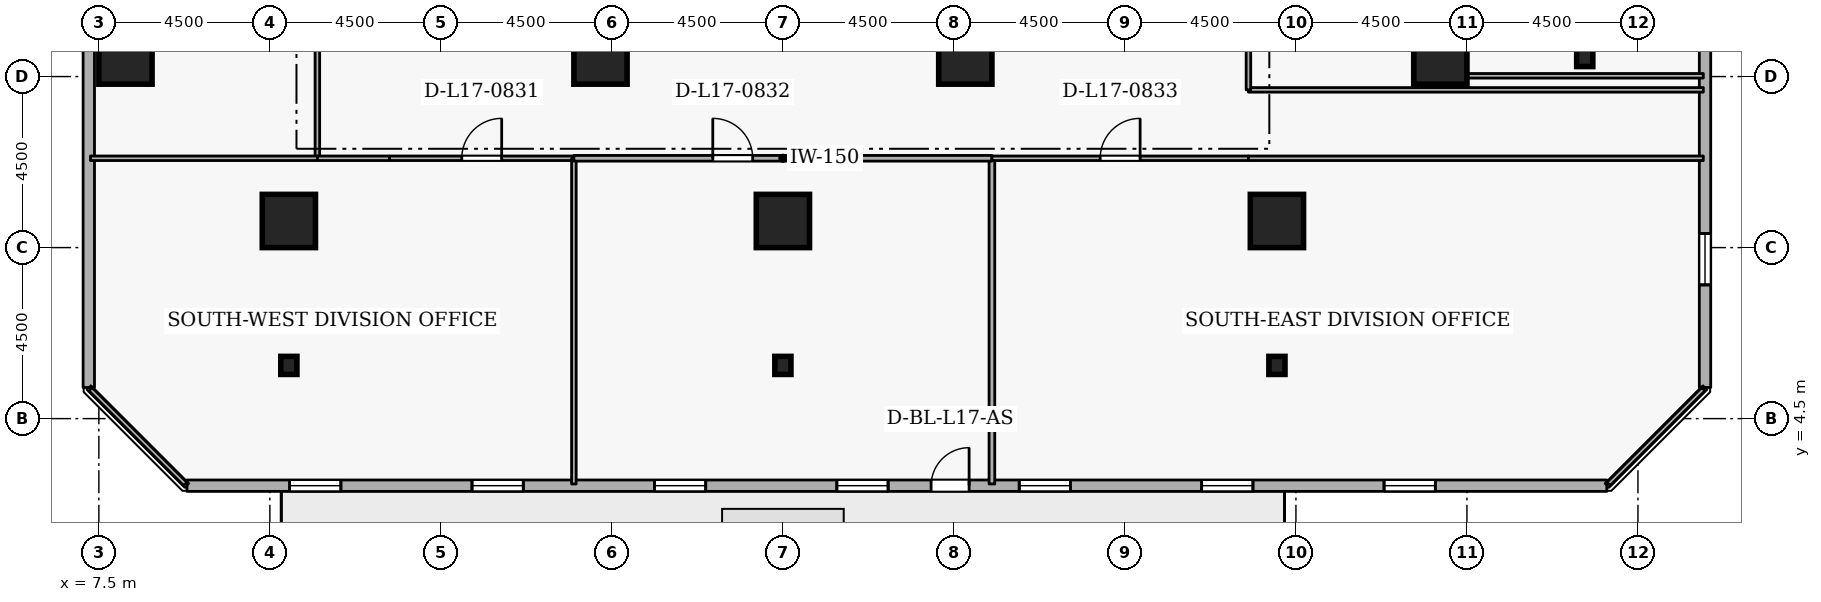
"""IFC4 building model, lengths in metres.
Left out: names, types, materials, properties, quantities, classifications, styles, units other than length and angle.
Written with IfcOpenShell. Run it as: python <this file> out.ifc"""

import sys

from ifc_helpers import new_model, si_unit, direction, frame, frame_2d, origin, origin_2d, place, context, subcontext, project, spatial, rectangle, i_section, extrude, element, fill, save


model = new_model("IFC4")
c1 = context("Model", 3, precision=1e-05, world=origin(), true_north=direction((0.0, 1.0)))
c2 = subcontext(c1, "Body", "Model", "MODEL_VIEW")
j1 = project(units=[si_unit("LENGTHUNIT", "METRE"), si_unit("PLANEANGLEUNIT", "RADIAN")], contexts=[c1])
p1 = place(None, origin())
s1 = spatial("IfcSite", under=j1, at=p1, CompositionType="ELEMENT")
p2 = place(p1, origin())
s2 = spatial("IfcBuilding", under=s1, at=p2, CompositionType="ELEMENT")
p3 = place(p2, frame((0.0, 0.0, 68.1)))
s3 = spatial("IfcBuildingStorey", under=s2, at=p3, CompositionType="ELEMENT", Elevation=68.1)
for number, where, z_axis, x_axis in (
    (1, (12.5, 9.7, 0.0), (0.0, 0.0, 1.0), (1.0, 0.0, 0.0)),
    (2, (25.5, 9.7, 0.0), (0.0, 0.0, 1.0), (1.0, 0.0, 0.0)),
    (3, (38.5, 9.7, 0.0), (0.0, 0.0, 1.0), (1.0, 0.0, 0.0)),
    (4, (42.8, 14.0, 0.0), (0.0, 0.0, 1.0), (1.0, 0.0, 0.0)),
    (5, (8.2, 14.0, 0.0), (0.0, 0.0, 1.0), (1.0, 0.0, 0.0)),
    (6, (20.7, 14.0, 0.0), (0.0, 0.0, 1.0), (1.0, 0.0, 0.0)),
    (7, (30.3, 14.0, 0.0), (0.0, 0.0, 1.0), (1.0, 0.0, 0.0)),
):
    element("IfcColumn", number, at=place(p3, frame(where, z_axis=z_axis, x_axis=x_axis)), inside=s3, PredefinedType="COLUMN", context=c2, shape_type="SweptSolid", body=[
        extrude(rectangle(XDim=1.4, YDim=1.4, at=origin_2d()), origin(), (0.0, 0.0, 1.0), 3.6),
    ])
for number, where, z_axis, x_axis in (
    (8, (12.5, 5.9, 0.0), (0.0, 0.0, 1.0), (1.0, 0.0, 0.0)),
    (9, (25.5, 5.9, 0.0), (0.0, 0.0, 1.0), (1.0, 0.0, 0.0)),
    (10, (38.5, 5.9, 0.0), (0.0, 0.0, 1.0), (1.0, 0.0, 0.0)),
    (11, (46.6, 14.0, 0.0), (0.0, 0.0, 1.0), (1.0, 0.0, 0.0)),
):
    element("IfcColumn", number, at=place(p3, frame(where, z_axis=z_axis, x_axis=x_axis)), inside=s3, PredefinedType="COLUMN", context=c2, shape_type="SweptSolid", body=[
        extrude(i_section(OverallWidth=0.424, OverallDepth=0.475, WebThickness=0.048, FlangeThickness=0.077, FilletRadius=0.015, at=origin_2d()), origin(), (0.0, 0.0, 1.0), 3.6),
    ])
p4 = place(p3, frame((9.819, 2.735, 0.0), z_axis=(0.0, 0.0, 1.0), x_axis=(1.0, 0.0, 0.0)))
e12 = element("IfcWall", 12, at=p4, inside=s3, PredefinedType="STANDARD", context=c2, shape_type="SweptSolid", body=[
    extrude(rectangle(XDim=37.362, YDim=0.3, at=frame_2d((18.681, 0.0))), origin(), (0.0, 0.0, 1.0), 2.66),
])
p5 = place(p4, frame((19.581, 0.0, 0.0)))
e13 = element("IfcOpeningElement", 13, at=p5, cuts=e12, PredefinedType="OPENING", context=c2, shape_type="SweptSolid", body=[
    extrude(rectangle(XDim=1.0, YDim=2.08, at=frame_2d((0.5, 1.04))), frame((0.0, 0.16, 0.0), z_axis=(0.0, -1.0, 0.0), x_axis=(1.0, 0.0, 0.0)), (0.0, 0.0, 1.0), 0.32),
])
p6 = place(p4, frame((2.7, 0.0, 0.72)))
e14 = element("IfcOpeningElement", 14, at=p6, cuts=e12, PredefinedType="OPENING", context=c2, shape_type="SweptSolid", body=[
    extrude(rectangle(XDim=1.35, YDim=1.05, at=frame_2d((0.675, 0.525))), frame((0.0, 0.16, 0.0), z_axis=(0.0, -1.0, 0.0), x_axis=(1.0, 0.0, 0.0)), (0.0, 0.0, 1.0), 0.32),
])
p7 = place(p4, frame((7.5, 0.0, 0.72)))
e15 = element("IfcOpeningElement", 15, at=p7, cuts=e12, PredefinedType="OPENING", context=c2, shape_type="SweptSolid", body=[
    extrude(rectangle(XDim=1.35, YDim=1.05, at=frame_2d((0.675, 0.525))), frame((0.0, 0.16, 0.0), z_axis=(0.0, -1.0, 0.0), x_axis=(1.0, 0.0, 0.0)), (0.0, 0.0, 1.0), 0.32),
])
p8 = place(p4, frame((12.3, 0.0, 0.72)))
e16 = element("IfcOpeningElement", 16, at=p8, cuts=e12, PredefinedType="OPENING", context=c2, shape_type="SweptSolid", body=[
    extrude(rectangle(XDim=1.35, YDim=1.05, at=frame_2d((0.675, 0.525))), frame((0.0, 0.16, 0.0), z_axis=(0.0, -1.0, 0.0), x_axis=(1.0, 0.0, 0.0)), (0.0, 0.0, 1.0), 0.32),
])
p9 = place(p4, frame((17.1, 0.0, 0.72)))
e17 = element("IfcOpeningElement", 17, at=p9, cuts=e12, PredefinedType="OPENING", context=c2, shape_type="SweptSolid", body=[
    extrude(rectangle(XDim=1.35, YDim=1.05, at=frame_2d((0.675, 0.525))), frame((0.0, 0.16, 0.0), z_axis=(0.0, -1.0, 0.0), x_axis=(1.0, 0.0, 0.0)), (0.0, 0.0, 1.0), 0.32),
])
p10 = place(p4, frame((21.9, 0.0, 0.72)))
e18 = element("IfcOpeningElement", 18, at=p10, cuts=e12, PredefinedType="OPENING", context=c2, shape_type="SweptSolid", body=[
    extrude(rectangle(XDim=1.35, YDim=1.05, at=frame_2d((0.675, 0.525))), frame((0.0, 0.16, 0.0), z_axis=(0.0, -1.0, 0.0), x_axis=(1.0, 0.0, 0.0)), (0.0, 0.0, 1.0), 0.32),
])
p11 = place(p4, frame((26.7, 0.0, 0.72)))
e19 = element("IfcOpeningElement", 19, at=p11, cuts=e12, PredefinedType="OPENING", context=c2, shape_type="SweptSolid", body=[
    extrude(rectangle(XDim=1.35, YDim=1.05, at=frame_2d((0.675, 0.525))), frame((0.0, 0.16, 0.0), z_axis=(0.0, -1.0, 0.0), x_axis=(1.0, 0.0, 0.0)), (0.0, 0.0, 1.0), 0.32),
])
p12 = place(p4, frame((31.5, 0.0, 0.72)))
e20 = element("IfcOpeningElement", 20, at=p12, cuts=e12, PredefinedType="OPENING", context=c2, shape_type="SweptSolid", body=[
    extrude(rectangle(XDim=1.35, YDim=1.05, at=frame_2d((0.675, 0.525))), frame((0.0, 0.16, 0.0), z_axis=(0.0, -1.0, 0.0), x_axis=(1.0, 0.0, 0.0)), (0.0, 0.0, 1.0), 0.32),
])
p13 = place(p3, frame((49.765, 5.319, 0.0), z_axis=(0.0, 0.0, 1.0), x_axis=(0.0, 1.0, 0.0)))
e21 = element("IfcWall", 21, at=p13, inside=s3, PredefinedType="STANDARD", context=c2, shape_type="SweptSolid", body=[
    extrude(rectangle(XDim=37.362, YDim=0.3, at=frame_2d((18.681, 0.0))), origin(), (0.0, 0.0, 1.0), 2.66),
])
p14 = place(p13, frame((2.7, 0.0, 0.72)))
e22 = element("IfcOpeningElement", 22, at=p14, cuts=e21, PredefinedType="OPENING", context=c2, shape_type="SweptSolid", body=[
    extrude(rectangle(XDim=1.35, YDim=1.05, at=frame_2d((0.675, 0.525))), frame((0.0, 0.16, 0.0), z_axis=(0.0, -1.0, 0.0), x_axis=(1.0, 0.0, 0.0)), (0.0, 0.0, 1.0), 0.32),
])
p15 = place(p13, frame((12.3, 0.0, 0.72)))
e23 = element("IfcOpeningElement", 23, at=p15, cuts=e21, PredefinedType="OPENING", context=c2, shape_type="SweptSolid", body=[
    extrude(rectangle(XDim=1.35, YDim=1.05, at=frame_2d((0.675, 0.525))), frame((0.0, 0.16, 0.0), z_axis=(0.0, -1.0, 0.0), x_axis=(1.0, 0.0, 0.0)), (0.0, 0.0, 1.0), 0.32),
])
p16 = place(p13, frame((26.7, 0.0, 0.72)))
e24 = element("IfcOpeningElement", 24, at=p16, cuts=e21, PredefinedType="OPENING", context=c2, shape_type="SweptSolid", body=[
    extrude(rectangle(XDim=1.35, YDim=1.05, at=frame_2d((0.675, 0.525))), frame((0.0, 0.16, 0.0), z_axis=(0.0, -1.0, 0.0), x_axis=(1.0, 0.0, 0.0)), (0.0, 0.0, 1.0), 0.32),
])
p17 = place(p13, frame((31.5, 0.0, 0.72)))
e25 = element("IfcOpeningElement", 25, at=p17, cuts=e21, PredefinedType="OPENING", context=c2, shape_type="SweptSolid", body=[
    extrude(rectangle(XDim=1.35, YDim=1.05, at=frame_2d((0.675, 0.525))), frame((0.0, 0.16, 0.0), z_axis=(0.0, -1.0, 0.0), x_axis=(1.0, 0.0, 0.0)), (0.0, 0.0, 1.0), 0.32),
])
p18 = place(p3, frame((7.235, 42.681, 0.0), z_axis=(0.0, 0.0, 1.0), x_axis=(0.0, -1.0, 0.0)))
e26 = element("IfcWall", 26, at=p18, inside=s3, PredefinedType="STANDARD", context=c2, shape_type="SweptSolid", body=[
    extrude(rectangle(XDim=37.362, YDim=0.3, at=frame_2d((18.681, 0.0))), origin(), (0.0, 0.0, 1.0), 2.66),
])
p19 = place(p18, frame((7.5, 0.0, 0.72)))
e27 = element("IfcOpeningElement", 27, at=p19, cuts=e26, PredefinedType="OPENING", context=c2, shape_type="SweptSolid", body=[
    extrude(rectangle(XDim=1.35, YDim=1.05, at=frame_2d((0.675, 0.525))), frame((0.0, 0.16, 0.0), z_axis=(0.0, -1.0, 0.0), x_axis=(1.0, 0.0, 0.0)), (0.0, 0.0, 1.0), 0.32),
])
p20 = place(p18, frame((17.1, 0.0, 0.72)))
e28 = element("IfcOpeningElement", 28, at=p20, cuts=e26, PredefinedType="OPENING", context=c2, shape_type="SweptSolid", body=[
    extrude(rectangle(XDim=1.35, YDim=1.05, at=frame_2d((0.675, 0.525))), frame((0.0, 0.16, 0.0), z_axis=(0.0, -1.0, 0.0), x_axis=(1.0, 0.0, 0.0)), (0.0, 0.0, 1.0), 0.32),
])
p21 = place(p18, frame((21.9, 0.0, 0.72)))
e29 = element("IfcOpeningElement", 29, at=p21, cuts=e26, PredefinedType="OPENING", context=c2, shape_type="SweptSolid", body=[
    extrude(rectangle(XDim=1.35, YDim=1.05, at=frame_2d((0.675, 0.525))), frame((0.0, 0.16, 0.0), z_axis=(0.0, -1.0, 0.0), x_axis=(1.0, 0.0, 0.0)), (0.0, 0.0, 1.0), 0.32),
])
p22 = place(p3, frame((13.25, 20.7, 0.0), z_axis=(0.0, 0.0, 1.0), x_axis=(0.0, -1.0, 0.0)))
e30 = element("IfcWall", 30, at=p22, inside=s3, PredefinedType="PARTITIONING", context=c2, shape_type="SweptSolid", body=[
    extrude(rectangle(XDim=9.35, YDim=0.12, at=frame_2d((4.675, 0.0))), origin(), (0.0, 0.0, 1.0), 3.26),
])
p23 = place(p22, frame((4.15, 0.0, 0.0)))
e31 = element("IfcOpeningElement", 31, at=p23, cuts=e30, PredefinedType="OPENING", context=c2, shape_type="SweptSolid", body=[
    extrude(rectangle(XDim=1.05, YDim=2.1, at=frame_2d((0.525, 1.05))), frame((0.0, 0.07, 0.0), z_axis=(0.0, -1.0, 0.0), x_axis=(1.0, 0.0, 0.0)), (0.0, 0.0, 1.0), 0.14),
])
p24 = place(p3, frame((13.25, 11.35, 0.0), z_axis=(0.0, 0.0, 1.0), x_axis=(-1.0, 0.0, 0.0)))
e32 = element("IfcWall", 32, at=p24, inside=s3, PredefinedType="PARTITIONING", context=c2, shape_type="SweptSolid", body=[
    extrude(rectangle(XDim=5.97, YDim=0.12, at=frame_2d((2.985, 0.0))), origin(), (0.0, 0.0, 1.0), 3.26),
])
p25 = place(p3, frame((42.8, 13.52, 0.0), z_axis=(0.0, 0.0, 1.0), x_axis=(1.0, 0.0, 0.0)))
e33 = element("IfcWall", 33, at=p25, inside=s3, PredefinedType="PARTITIONING", context=c2, shape_type="SweptSolid", body=[
    extrude(rectangle(XDim=6.92, YDim=0.12, at=frame_2d((3.46, 0.0))), origin(), (0.0, 0.0, 1.0), 3.26),
])
p26 = place(p3, frame((49.72, 13.15, 0.0), z_axis=(0.0, 0.0, 1.0), x_axis=(-1.0, 0.0, 0.0)))
e34 = element("IfcWall", 34, at=p26, inside=s3, PredefinedType="PARTITIONING", context=c2, shape_type="SweptSolid", body=[
    extrude(rectangle(XDim=11.97, YDim=0.12, at=frame_2d((5.985, 0.0))), origin(), (0.0, 0.0, 1.0), 3.26),
])
p27 = place(p3, frame((37.75, 13.15, 0.0), z_axis=(0.0, 0.0, 1.0), x_axis=(0.0, 1.0, 0.0)))
e35 = element("IfcWall", 35, at=p27, inside=s3, PredefinedType="PARTITIONING", context=c2, shape_type="SweptSolid", body=[
    extrude(rectangle(XDim=1.862, YDim=0.12, at=frame_2d((0.931, 0.0))), origin(), (0.0, 0.0, 1.0), 3.26),
])
p28 = place(p3, frame((13.25, 11.35, 0.0), z_axis=(0.0, 0.0, 1.0), x_axis=(1.0, 0.0, 0.0)))
e36 = element("IfcWall", 36, at=p28, inside=s3, PredefinedType="PARTITIONING", context=c2, shape_type="SweptSolid", body=[
    extrude(rectangle(XDim=1.9, YDim=0.12, at=frame_2d((0.95, 0.0))), origin(), (0.0, 0.0, 1.0), 3.26),
])
p29 = place(p3, frame((15.15, 11.35, 0.0), z_axis=(0.0, 0.0, 1.0), x_axis=(1.0, 0.0, 0.0)))
e37 = element("IfcWall", 37, at=p29, inside=s3, PredefinedType="PARTITIONING", context=c2, shape_type="SweptSolid", body=[
    extrude(rectangle(XDim=4.85, YDim=0.12, at=frame_2d((2.425, 0.0))), origin(), (0.0, 0.0, 1.0), 3.26),
])
p30 = place(p29, frame((1.9, 0.0, 0.0)))
e38 = element("IfcOpeningElement", 38, at=p30, cuts=e37, PredefinedType="OPENING", context=c2, shape_type="SweptSolid", body=[
    extrude(rectangle(XDim=1.05, YDim=2.1, at=frame_2d((0.525, 1.05))), frame((0.0, 0.07, 0.0), z_axis=(0.0, -1.0, 0.0), x_axis=(1.0, 0.0, 0.0)), (0.0, 0.0, 1.0), 0.14),
])
p31 = place(p3, frame((20.0, 11.35, 0.0), z_axis=(0.0, 0.0, 1.0), x_axis=(0.0, -1.0, 0.0)))
e39 = element("IfcWall", 39, at=p31, inside=s3, PredefinedType="PARTITIONING", context=c2, shape_type="SweptSolid", body=[
    extrude(rectangle(XDim=8.57, YDim=0.12, at=frame_2d((4.285, 0.0))), origin(), (0.0, 0.0, 1.0), 3.26),
])
p32 = place(p3, frame((9.775, 2.78, 0.0), z_axis=(0.0, 0.0, 1.0), x_axis=(-0.707106781187, 0.707106781187, 0.0)))
e40 = element("IfcWall", 40, at=p32, inside=s3, PredefinedType="PARTITIONING", context=c2, shape_type="SweptSolid", body=[
    extrude(rectangle(XDim=3.528, YDim=0.12, at=frame_2d((1.764, 0.0))), origin(), (0.0, 0.0, 1.0), 3.26),
])
p33 = place(p3, frame((31.0, 11.35, 0.0), z_axis=(0.0, 0.0, 1.0), x_axis=(0.0, -1.0, 0.0)))
e41 = element("IfcWall", 41, at=p33, inside=s3, PredefinedType="PARTITIONING", context=c2, shape_type="SweptSolid", body=[
    extrude(rectangle(XDim=8.57, YDim=0.15, at=frame_2d((4.285, 0.0))), origin(), (0.0, 0.0, 1.0), 3.26),
])
p34 = place(p3, frame((20.0, 11.35, 0.0), z_axis=(0.0, 0.0, 1.0), x_axis=(1.0, 0.0, 0.0)))
e42 = element("IfcWall", 42, at=p34, inside=s3, PredefinedType="PARTITIONING", context=c2, shape_type="SweptSolid", body=[
    extrude(rectangle(XDim=11.0, YDim=0.15, at=frame_2d((5.5, 0.0))), origin(), (0.0, 0.0, 1.0), 3.26),
])
p35 = place(p34, frame((3.655, 0.0, 0.0)))
e43 = element("IfcOpeningElement", 43, at=p35, cuts=e42, PredefinedType="OPENING", context=c2, shape_type="SweptSolid", body=[
    extrude(rectangle(XDim=1.05, YDim=2.1, at=frame_2d((0.525, 1.05))), frame((0.0, 0.085, 0.0), z_axis=(0.0, -1.0, 0.0), x_axis=(1.0, 0.0, 0.0)), (0.0, 0.0, 1.0), 0.17),
])
p36 = place(p3, frame((31.0, 11.35, 0.0), z_axis=(0.0, 0.0, 1.0), x_axis=(1.0, 0.0, 0.0)))
e44 = element("IfcWall", 44, at=p36, inside=s3, PredefinedType="PARTITIONING", context=c2, shape_type="SweptSolid", body=[
    extrude(rectangle(XDim=6.75, YDim=0.12, at=frame_2d((3.375, 0.0))), origin(), (0.0, 0.0, 1.0), 3.26),
])
p37 = place(p36, frame((2.85, 0.0, 0.0)))
e45 = element("IfcOpeningElement", 45, at=p37, cuts=e44, PredefinedType="OPENING", context=c2, shape_type="SweptSolid", body=[
    extrude(rectangle(XDim=1.05, YDim=2.1, at=frame_2d((0.525, 1.05))), frame((0.0, 0.07, 0.0), z_axis=(0.0, -1.0, 0.0), x_axis=(1.0, 0.0, 0.0)), (0.0, 0.0, 1.0), 0.14),
])
p38 = place(p3, frame((37.75, 11.35, 0.0), z_axis=(0.0, 0.0, 1.0), x_axis=(1.0, 0.0, 0.0)))
e46 = element("IfcWall", 46, at=p38, inside=s3, PredefinedType="PARTITIONING", context=c2, shape_type="SweptSolid", body=[
    extrude(rectangle(XDim=11.97, YDim=0.12, at=frame_2d((5.985, 0.0))), origin(), (0.0, 0.0, 1.0), 3.26),
])
p39 = place(p3, frame((49.72, 5.275, 0.0), z_axis=(0.0, 0.0, 1.0), x_axis=(-0.707106781187, -0.707106781187, 0.0)))
e47 = element("IfcWall", 47, at=p39, inside=s3, PredefinedType="PARTITIONING", context=c2, shape_type="SweptSolid", body=[
    extrude(rectangle(XDim=3.528, YDim=0.12, at=frame_2d((1.764, 0.0))), origin(), (0.0, 0.0, 1.0), 3.26),
])
p40 = place(p5, origin())
e48 = element("IfcDoor", 48, at=p40, inside=s3, OperationType="SINGLE_SWING_RIGHT", PredefinedType="DOOR", context=c2, shape_type="SweptSolid", body=[
    extrude(rectangle(XDim=1.0, YDim=2.08, at=frame_2d((0.5, 1.04))), frame((0.0, 0.025, 0.0), z_axis=(0.0, -1.0, 0.0), x_axis=(1.0, 0.0, 0.0)), (0.0, 0.0, 1.0), 0.05),
])
fill(e13, e48)
p41 = place(p6, origin())
e49 = element("IfcWindow", 49, at=p41, inside=s3, PartitioningType="SINGLE_PANEL", PredefinedType="WINDOW", context=c2, shape_type="SweptSolid", body=[
    extrude(rectangle(XDim=1.35, YDim=1.05, at=frame_2d((0.675, 0.525))), frame((0.0, 0.03, 0.0), z_axis=(0.0, -1.0, 0.0), x_axis=(1.0, 0.0, 0.0)), (0.0, 0.0, 1.0), 0.06),
])
fill(e14, e49)
p42 = place(p7, origin())
e50 = element("IfcWindow", 50, at=p42, inside=s3, PartitioningType="SINGLE_PANEL", PredefinedType="WINDOW", context=c2, shape_type="SweptSolid", body=[
    extrude(rectangle(XDim=1.35, YDim=1.05, at=frame_2d((0.675, 0.525))), frame((0.0, 0.03, 0.0), z_axis=(0.0, -1.0, 0.0), x_axis=(1.0, 0.0, 0.0)), (0.0, 0.0, 1.0), 0.06),
])
fill(e15, e50)
p43 = place(p8, origin())
e51 = element("IfcWindow", 51, at=p43, inside=s3, PartitioningType="SINGLE_PANEL", PredefinedType="WINDOW", context=c2, shape_type="SweptSolid", body=[
    extrude(rectangle(XDim=1.35, YDim=1.05, at=frame_2d((0.675, 0.525))), frame((0.0, 0.03, 0.0), z_axis=(0.0, -1.0, 0.0), x_axis=(1.0, 0.0, 0.0)), (0.0, 0.0, 1.0), 0.06),
])
fill(e16, e51)
p44 = place(p9, origin())
e52 = element("IfcWindow", 52, at=p44, inside=s3, PartitioningType="SINGLE_PANEL", PredefinedType="WINDOW", context=c2, shape_type="SweptSolid", body=[
    extrude(rectangle(XDim=1.35, YDim=1.05, at=frame_2d((0.675, 0.525))), frame((0.0, 0.03, 0.0), z_axis=(0.0, -1.0, 0.0), x_axis=(1.0, 0.0, 0.0)), (0.0, 0.0, 1.0), 0.06),
])
fill(e17, e52)
p45 = place(p10, origin())
e53 = element("IfcWindow", 53, at=p45, inside=s3, PartitioningType="SINGLE_PANEL", PredefinedType="WINDOW", context=c2, shape_type="SweptSolid", body=[
    extrude(rectangle(XDim=1.35, YDim=1.05, at=frame_2d((0.675, 0.525))), frame((0.0, 0.03, 0.0), z_axis=(0.0, -1.0, 0.0), x_axis=(1.0, 0.0, 0.0)), (0.0, 0.0, 1.0), 0.06),
])
fill(e18, e53)
p46 = place(p11, origin())
e54 = element("IfcWindow", 54, at=p46, inside=s3, PartitioningType="SINGLE_PANEL", PredefinedType="WINDOW", context=c2, shape_type="SweptSolid", body=[
    extrude(rectangle(XDim=1.35, YDim=1.05, at=frame_2d((0.675, 0.525))), frame((0.0, 0.03, 0.0), z_axis=(0.0, -1.0, 0.0), x_axis=(1.0, 0.0, 0.0)), (0.0, 0.0, 1.0), 0.06),
])
fill(e19, e54)
p47 = place(p12, origin())
e55 = element("IfcWindow", 55, at=p47, inside=s3, PartitioningType="SINGLE_PANEL", PredefinedType="WINDOW", context=c2, shape_type="SweptSolid", body=[
    extrude(rectangle(XDim=1.35, YDim=1.05, at=frame_2d((0.675, 0.525))), frame((0.0, 0.03, 0.0), z_axis=(0.0, -1.0, 0.0), x_axis=(1.0, 0.0, 0.0)), (0.0, 0.0, 1.0), 0.06),
])
fill(e20, e55)
p48 = place(p14, origin())
e56 = element("IfcWindow", 56, at=p48, inside=s3, PartitioningType="SINGLE_PANEL", PredefinedType="WINDOW", context=c2, shape_type="SweptSolid", body=[
    extrude(rectangle(XDim=1.35, YDim=1.05, at=frame_2d((0.675, 0.525))), frame((0.0, 0.03, 0.0), z_axis=(0.0, -1.0, 0.0), x_axis=(1.0, 0.0, 0.0)), (0.0, 0.0, 1.0), 0.06),
])
fill(e22, e56)
p49 = place(p30, origin())
e57 = element("IfcDoor", 57, at=p49, inside=s3, OperationType="SINGLE_SWING_RIGHT", PredefinedType="DOOR", context=c2, shape_type="SweptSolid", body=[
    extrude(rectangle(XDim=1.05, YDim=2.1, at=frame_2d((0.525, 1.05))), frame((0.0, 0.025, 0.0), z_axis=(0.0, -1.0, 0.0), x_axis=(1.0, 0.0, 0.0)), (0.0, 0.0, 1.0), 0.05),
])
fill(e38, e57)
p50 = place(p35, origin())
e58 = element("IfcDoor", 58, at=p50, inside=s3, OperationType="SINGLE_SWING_LEFT", PredefinedType="DOOR", context=c2, shape_type="SweptSolid", body=[
    extrude(rectangle(XDim=1.05, YDim=2.1, at=frame_2d((0.525, 1.05))), frame((0.0, 0.025, 0.0), z_axis=(0.0, -1.0, 0.0), x_axis=(1.0, 0.0, 0.0)), (0.0, 0.0, 1.0), 0.05),
])
fill(e43, e58)
p51 = place(p37, origin())
e59 = element("IfcDoor", 59, at=p51, inside=s3, OperationType="SINGLE_SWING_RIGHT", PredefinedType="DOOR", context=c2, shape_type="SweptSolid", body=[
    extrude(rectangle(XDim=1.05, YDim=2.1, at=frame_2d((0.525, 1.05))), frame((0.0, 0.025, 0.0), z_axis=(0.0, -1.0, 0.0), x_axis=(1.0, 0.0, 0.0)), (0.0, 0.0, 1.0), 0.05),
])
fill(e45, e59)
save(model, sys.argv[1])
